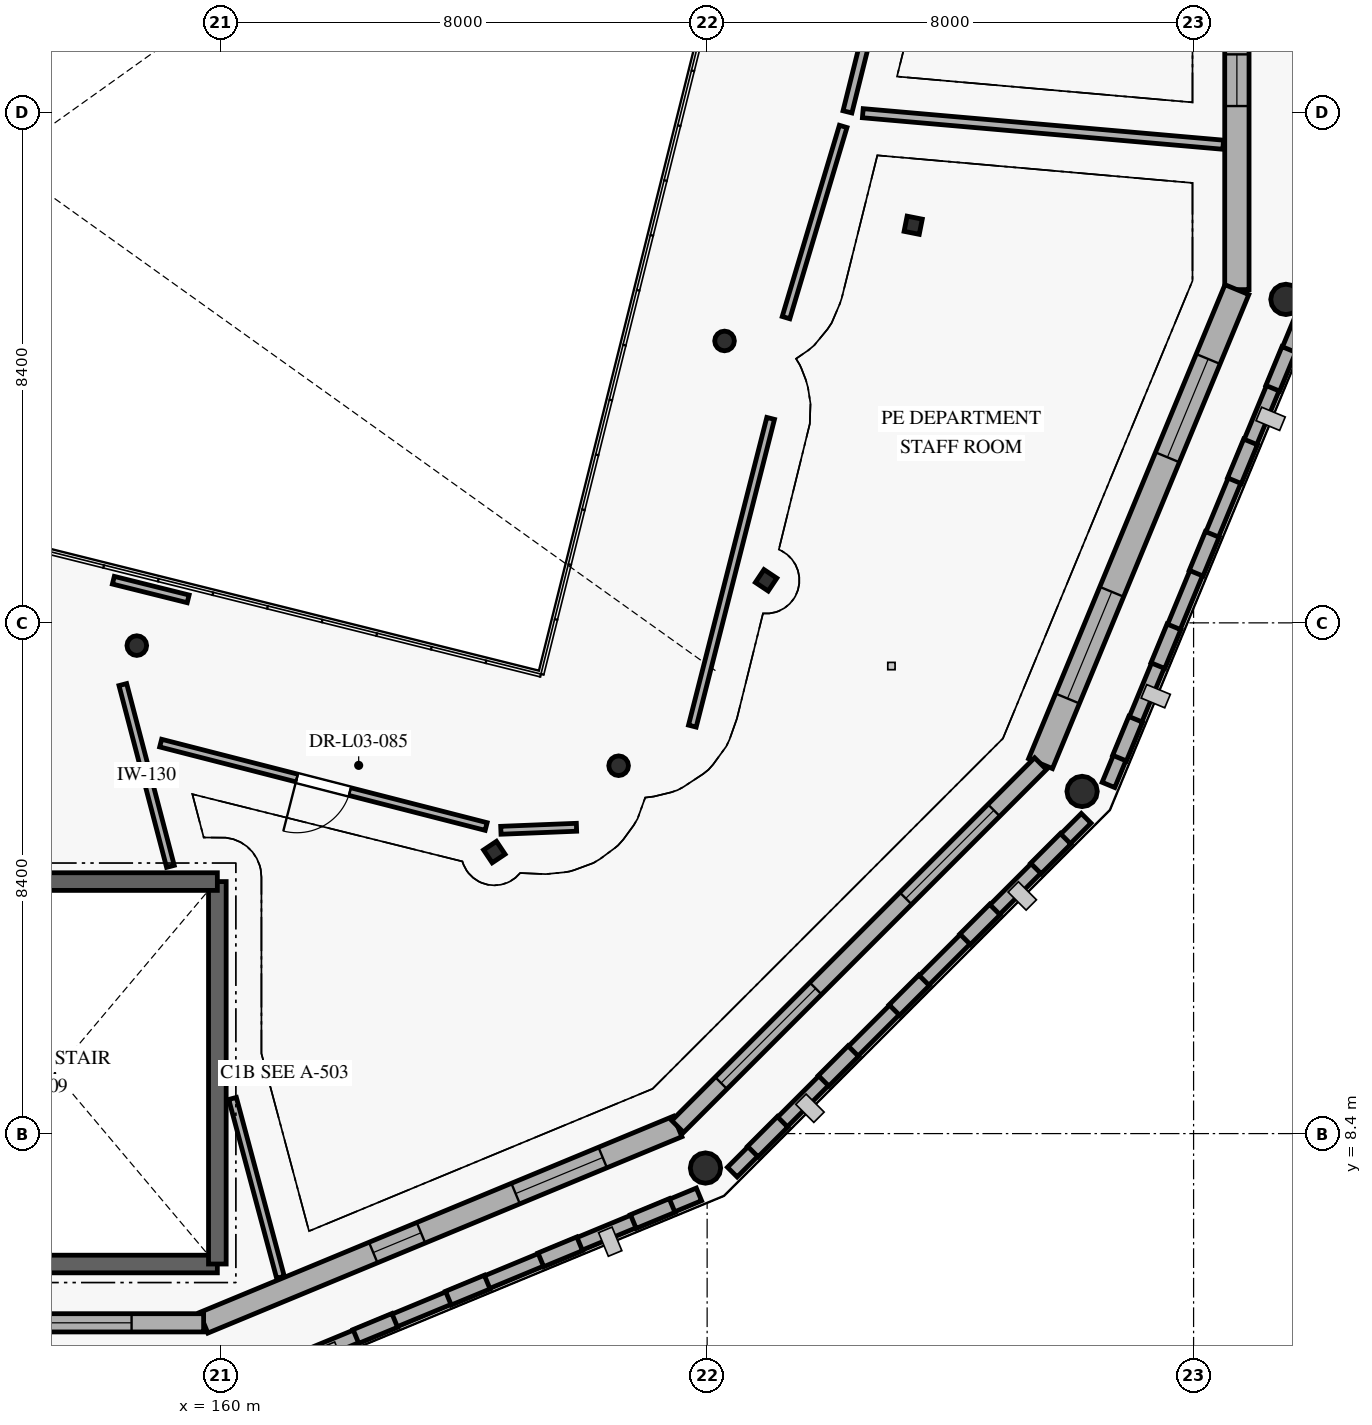
"""IFC4 building model, lengths in metres.
Left out: names, types, materials, properties, quantities, classifications, styles, units other than length and angle.
Written with IfcOpenShell. Run it as: python <this file> out.ifc"""

import sys

from ifc_helpers import new_model, si_unit, direction, frame, frame_2d, origin, origin_2d, place, context, subcontext, project, spatial, rectangle, circle, hollow_circle, i_section, extrude, element, fill, save


model = new_model("IFC4")
c1 = context("Model", 3, precision=1e-05, world=origin(), true_north=direction((0.0, 1.0)))
c2 = subcontext(c1, "Body", "Model", "MODEL_VIEW")
j1 = project(units=[si_unit("LENGTHUNIT", "METRE"), si_unit("PLANEANGLEUNIT", "RADIAN")], contexts=[c1])
p1 = place(None, origin())
s1 = spatial("IfcSite", under=j1, at=p1, CompositionType="ELEMENT")
p2 = place(p1, origin())
s2 = spatial("IfcBuilding", under=s1, at=p2, CompositionType="ELEMENT")
p3 = place(p2, frame((0.0, 0.0, 12.6)))
s3 = spatial("IfcBuildingStorey", under=s2, at=p3, CompositionType="ELEMENT", Elevation=12.6)
for number, where, z_axis, x_axis in (
    (1, (158.62, 16.426, 0.0), (0.0, 0.0, 1.0), (0.97, -0.242, 0.0)),
    (2, (166.544, 14.45, 0.0), (0.0, 0.0, 1.0), (0.97, -0.242, 0.0)),
    (3, (168.286, 21.437, 0.0), (0.0, 0.0, 1.0), (0.97, -0.242, 0.0)),
):
    element("IfcColumn", number, at=place(p3, frame(where, z_axis=z_axis, x_axis=x_axis)), inside=s3, PredefinedType="COLUMN", context=c2, shape_type="SweptSolid", body=[
        extrude(hollow_circle(Radius=0.162, WallThickness=0.016, at=origin_2d()), origin(), (0.0, 0.0, 1.0), 4.2),
    ])
for number, where, z_axis, x_axis in (
    (4, (167.973, 7.833, 0.0), (0.0, 0.0, 1.0), (0.831, 0.556, 0.0)),
    (5, (174.167, 14.027, 0.0), (0.0, 0.0, 1.0), (0.556, 0.831, 0.0)),
    (6, (177.519, 22.12, 0.0), (0.0, 0.0, 1.0), (0.195, 0.981, 0.0)),
):
    element("IfcColumn", number, at=place(p3, frame(where, z_axis=z_axis, x_axis=x_axis)), inside=s3, PredefinedType="COLUMN", context=c2, shape_type="SweptSolid", body=[
        extrude(circle(Radius=0.25, at=origin_2d()), origin(), (0.0, 0.0, 1.0), 4.2),
    ])
for number, where, z_axis, x_axis in (
    (7, (164.5, 13.03, 0.0), (0.0, 0.0, 1.0), (0.831, 0.556, 0.0)),
    (8, (168.97, 17.5, 0.0), (0.0, 0.0, 1.0), (0.556, 0.831, 0.0)),
    (9, (171.389, 23.34, 0.0), (0.0, 0.0, 1.0), (0.195, 0.981, 0.0)),
):
    element("IfcColumn", number, at=place(p3, frame(where, z_axis=z_axis, x_axis=x_axis)), inside=s3, PredefinedType="COLUMN", context=c2, shape_type="SweptSolid", body=[
        extrude(i_section(OverallWidth=0.255, OverallDepth=0.254, WebThickness=0.009, FlangeThickness=0.014, FilletRadius=0.013, at=origin_2d()), origin(), (0.0, 0.0, 1.0), 4.2),
    ])
p4 = place(p3, frame((167.516, 8.517, 0.0), z_axis=(0.0, 0.0, 1.0), x_axis=(-0.923884604839, -0.382671186453, 0.0)))
e10 = element("IfcWall", 10, at=p4, inside=s3, PredefinedType="SOLIDWALL", context=c2, shape_type="SweptSolid", body=[
    extrude(rectangle(XDim=8.439, YDim=0.365, at=frame_2d((4.219, 0.0))), origin(), (0.0, 0.0, 1.0), 3.94),
])
p5 = place(p4, frame((1.335, 0.0, 0.85)))
e11 = element("IfcOpeningElement", 11, at=p5, cuts=e10, PredefinedType="OPENING", context=c2, shape_type="SweptSolid", body=[
    extrude(rectangle(XDim=1.55, YDim=1.4, at=frame_2d((0.775, 0.7))), frame((0.0, 0.192, 0.0), z_axis=(0.0, -1.0, 0.0), x_axis=(1.0, 0.0, 0.0)), (0.0, 0.0, 1.0), 0.385),
])
p6 = place(p4, frame((4.569, 0.0, 0.85)))
e12 = element("IfcOpeningElement", 12, at=p6, cuts=e10, PredefinedType="OPENING", context=c2, shape_type="SweptSolid", body=[
    extrude(rectangle(XDim=0.85, YDim=1.4, at=frame_2d((0.425, 0.7))), frame((0.0, 0.192, 0.0), z_axis=(0.0, -1.0, 0.0), x_axis=(1.0, 0.0, 0.0)), (0.0, 0.0, 1.0), 0.385),
])
p7 = place(p3, frame((159.719, 5.288, 0.0), z_axis=(0.0, 0.0, 1.0), x_axis=(-1.0, 0.0, 0.0)))
e13 = element("IfcWall", 13, at=p7, inside=s3, PredefinedType="SOLIDWALL", context=c2, shape_type="SweptSolid", body=[
    extrude(rectangle(XDim=8.438, YDim=0.3, at=frame_2d((4.219, 0.0))), origin(), (0.0, 0.0, 1.0), 3.94),
])
p8 = place(p7, frame((1.185, 0.0, 0.85)))
e14 = element("IfcOpeningElement", 14, at=p8, cuts=e13, PredefinedType="OPENING", context=c2, shape_type="SweptSolid", body=[
    extrude(rectangle(XDim=1.85, YDim=1.4, at=frame_2d((0.925, 0.7))), frame((0.0, 0.16, 0.0), z_axis=(0.0, -1.0, 0.0), x_axis=(1.0, 0.0, 0.0)), (0.0, 0.0, 1.0), 0.32),
])
p9 = place(p7, frame((4.569, 0.0, 0.85)))
e15 = element("IfcOpeningElement", 15, at=p9, cuts=e13, PredefinedType="OPENING", context=c2, shape_type="SweptSolid", body=[
    extrude(rectangle(XDim=0.85, YDim=1.4, at=frame_2d((0.425, 0.7))), frame((0.0, 0.16, 0.0), z_axis=(0.0, -1.0, 0.0), x_axis=(1.0, 0.0, 0.0)), (0.0, 0.0, 1.0), 0.32),
])
p10 = place(p3, frame((176.712, 30.719, 0.0), z_axis=(0.0, 0.0, 1.0), x_axis=(0.0, -1.0, 0.0)))
e16 = element("IfcWall", 16, at=p10, inside=s3, PredefinedType="SOLIDWALL", context=c2, shape_type="SweptSolid", body=[
    extrude(rectangle(XDim=8.438, YDim=0.4, at=frame_2d((4.219, 0.0))), origin(), (0.0, 0.0, 1.0), 3.94),
])
p11 = place(p10, frame((1.385, 0.0, 0.85)))
e17 = element("IfcOpeningElement", 17, at=p11, cuts=e16, PredefinedType="OPENING", context=c2, shape_type="SweptSolid", body=[
    extrude(rectangle(XDim=1.45, YDim=1.8, at=frame_2d((0.725, 0.9))), frame((0.0, 0.21, 0.0), z_axis=(0.0, -1.0, 0.0), x_axis=(1.0, 0.0, 0.0)), (0.0, 0.0, 1.0), 0.42),
])
p12 = place(p10, frame((4.569, 0.0, 0.85)))
e18 = element("IfcOpeningElement", 18, at=p12, cuts=e16, PredefinedType="OPENING", context=c2, shape_type="SweptSolid", body=[
    extrude(rectangle(XDim=0.85, YDim=1.4, at=frame_2d((0.425, 0.7))), frame((0.0, 0.21, 0.0), z_axis=(0.0, -1.0, 0.0), x_axis=(1.0, 0.0, 0.0)), (0.0, 0.0, 1.0), 0.42),
])
p13 = place(p3, frame((176.712, 22.281, 0.0), z_axis=(0.0, 0.0, 1.0), x_axis=(-0.382671186453, -0.923884604839, 0.0)))
e19 = element("IfcWall", 19, at=p13, inside=s3, PredefinedType="SOLIDWALL", context=c2, shape_type="SweptSolid", body=[
    extrude(rectangle(XDim=8.439, YDim=0.425, at=frame_2d((4.219, 0.0))), origin(), (0.0, 0.0, 1.0), 3.94),
])
p14 = place(p13, frame((1.235, 0.0, 0.85)))
e20 = element("IfcOpeningElement", 20, at=p14, cuts=e19, PredefinedType="OPENING", context=c2, shape_type="SweptSolid", body=[
    extrude(rectangle(XDim=1.75, YDim=1.8, at=frame_2d((0.875, 0.9))), frame((0.0, 0.222, 0.0), z_axis=(0.0, -1.0, 0.0), x_axis=(1.0, 0.0, 0.0)), (0.0, 0.0, 1.0), 0.445),
])
p15 = place(p13, frame((5.379, 0.0, 0.85)))
e21 = element("IfcOpeningElement", 21, at=p15, cuts=e19, PredefinedType="OPENING", context=c2, shape_type="SweptSolid", body=[
    extrude(rectangle(XDim=1.9, YDim=1.8, at=frame_2d((0.95, 0.9))), frame((0.0, 0.222, 0.0), z_axis=(0.0, -1.0, 0.0), x_axis=(1.0, 0.0, 0.0)), (0.0, 0.0, 1.0), 0.445),
])
p16 = place(p3, frame((173.483, 14.484, 0.0), z_axis=(0.0, 0.0, 1.0), x_axis=(-0.707106781187, -0.707106781187, 0.0)))
e22 = element("IfcWall", 22, at=p16, inside=s3, PredefinedType="SOLIDWALL", context=c2, shape_type="SweptSolid", body=[
    extrude(rectangle(XDim=8.439, YDim=0.275, at=frame_2d((4.219, 0.0))), origin(), (0.0, 0.0, 1.0), 3.94),
])
p17 = place(p16, frame((1.085, 0.0, 0.85)))
e23 = element("IfcOpeningElement", 23, at=p17, cuts=e22, PredefinedType="OPENING", context=c2, shape_type="SweptSolid", body=[
    extrude(rectangle(XDim=2.05, YDim=1.8, at=frame_2d((1.025, 0.9))), frame((0.0, 0.147, 0.0), z_axis=(0.0, -1.0, 0.0), x_axis=(1.0, 0.0, 0.0)), (0.0, 0.0, 1.0), 0.295),
])
p18 = place(p16, frame((5.229, 0.0, 0.85)))
e24 = element("IfcOpeningElement", 24, at=p18, cuts=e22, PredefinedType="OPENING", context=c2, shape_type="SweptSolid", body=[
    extrude(rectangle(XDim=2.2, YDim=1.8, at=frame_2d((1.1, 0.9))), frame((0.0, 0.147, 0.0), z_axis=(0.0, -1.0, 0.0), x_axis=(1.0, 0.0, 0.0)), (0.0, 0.0, 1.0), 0.295),
])
p19 = place(p3, frame((160.262, 4.251, 0.0), z_axis=(0.0, 0.0, 1.0), x_axis=(0.923877990426, 0.382687155267, 0.0)))
e25 = element("IfcWall", 25, at=p19, inside=s3, PredefinedType="ELEMENTEDWALL", context=c2, shape_type="SweptSolid", body=[
    extrude(rectangle(XDim=8.23, YDim=0.225, at=frame_2d((4.115, 0.0))), origin(), (0.0, 0.0, 1.0), 1.09),
])
p20 = place(p3, frame((162.224, 5.063, 1.09), z_axis=(0.0, 0.0, 1.0), x_axis=(0.923848822335, 0.382757564877, 0.0)))
e26 = element("IfcWall", 26, at=p20, inside=s3, PredefinedType="ELEMENTEDWALL", context=c2, shape_type="SweptSolid", body=[
    extrude(rectangle(XDim=0.691, YDim=0.245, at=frame_2d((0.345, 0.0))), origin(), (0.0, 0.0, 1.0), 2.85),
])
for number, where, z_axis, x_axis in (
    (27, (163.745, 5.693, 1.09), (0.0, 0.0, 1.0), (0.924, 0.383, 0.0)),
    (28, (165.265, 6.323, 1.09), (0.0, 0.0, 1.0), (0.924, 0.383, 0.0)),
    (29, (166.786, 6.953, 1.09), (0.0, 0.0, 1.0), (0.924, 0.383, 0.0)),
):
    element("IfcWall", number, at=place(p3, frame(where, z_axis=z_axis, x_axis=x_axis)), inside=s3, PredefinedType="ELEMENTEDWALL", context=c2, shape_type="SweptSolid", body=[
        extrude(rectangle(XDim=0.691, YDim=0.245, at=frame_2d((0.345, 0.0))), origin(), (0.0, 0.0, 1.0), 2.85),
    ])
p21 = place(p3, frame((168.414, 7.767, 0.0), z_axis=(0.0, 0.0, 1.0), x_axis=(0.707106781187, 0.707106781187, 0.0)))
e30 = element("IfcWall", 30, at=p21, inside=s3, PredefinedType="ELEMENTEDWALL", context=c2, shape_type="SweptSolid", body=[
    extrude(rectangle(XDim=8.23, YDim=0.225, at=frame_2d((4.115, 0.0))), origin(), (0.0, 0.0, 1.0), 1.09),
])
p22 = place(p3, frame((168.752, 8.104, 1.09), z_axis=(0.0, 0.0, 1.0), x_axis=(0.706930114916, 0.707283403329, 0.0)))
e31 = element("IfcWall", 31, at=p22, inside=s3, PredefinedType="ELEMENTEDWALL", context=c2, shape_type="SweptSolid", body=[
    extrude(rectangle(XDim=0.691, YDim=0.245, at=frame_2d((0.346, 0.0))), origin(), (0.0, 0.0, 1.0), 2.85),
])
p23 = place(p3, frame((169.916, 9.268, 1.09), z_axis=(0.0, 0.0, 1.0), x_axis=(0.707106781187, 0.707106781187, 0.0)))
e32 = element("IfcWall", 32, at=p23, inside=s3, PredefinedType="ELEMENTEDWALL", context=c2, shape_type="SweptSolid", body=[
    extrude(rectangle(XDim=0.691, YDim=0.245, at=frame_2d((0.345, 0.0))), origin(), (0.0, 0.0, 1.0), 2.85),
])
p24 = place(p3, frame((171.079, 10.432, 1.09), z_axis=(0.0, 0.0, 1.0), x_axis=(0.707106781187, 0.707106781187, 0.0)))
e33 = element("IfcWall", 33, at=p24, inside=s3, PredefinedType="ELEMENTEDWALL", context=c2, shape_type="SweptSolid", body=[
    extrude(rectangle(XDim=0.691, YDim=0.245, at=frame_2d((0.346, 0.0))), origin(), (0.0, 0.0, 1.0), 2.85),
])
p25 = place(p3, frame((172.243, 11.596, 1.09), z_axis=(0.0, 0.0, 1.0), x_axis=(0.707106781187, 0.707106781187, 0.0)))
e34 = element("IfcWall", 34, at=p25, inside=s3, PredefinedType="ELEMENTEDWALL", context=c2, shape_type="SweptSolid", body=[
    extrude(rectangle(XDim=0.691, YDim=0.245, at=frame_2d((0.345, 0.0))), origin(), (0.0, 0.0, 1.0), 2.85),
])
p26 = place(p3, frame((173.407, 12.76, 1.09), z_axis=(0.0, 0.0, 1.0), x_axis=(0.707283403329, 0.706930114916, 0.0)))
e35 = element("IfcWall", 35, at=p26, inside=s3, PredefinedType="ELEMENTEDWALL", context=c2, shape_type="SweptSolid", body=[
    extrude(rectangle(XDim=0.691, YDim=0.245, at=frame_2d((0.346, 0.0))), origin(), (0.0, 0.0, 1.0), 2.85),
])
p27 = place(p3, frame((174.6, 14.135, 0.0), z_axis=(0.0, 0.0, 1.0), x_axis=(0.382687155267, 0.923877990426, 0.0)))
e36 = element("IfcWall", 36, at=p27, inside=s3, PredefinedType="ELEMENTEDWALL", context=c2, shape_type="SweptSolid", body=[
    extrude(rectangle(XDim=8.23, YDim=0.225, at=frame_2d((4.115, 0.0))), origin(), (0.0, 0.0, 1.0), 1.09),
])
for number, where, z_axis, x_axis in (
    (37, (174.783, 14.576, 1.09), (0.0, 0.0, 1.0), (0.383, 0.924, 0.0)),
    (38, (175.413, 16.096, 1.09), (0.0, 0.0, 1.0), (0.383, 0.924, 0.0)),
    (39, (176.042, 17.617, 1.09), (0.0, 0.0, 1.0), (0.383, 0.924, 0.0)),
):
    element("IfcWall", number, at=place(p3, frame(where, z_axis=z_axis, x_axis=x_axis)), inside=s3, PredefinedType="ELEMENTEDWALL", context=c2, shape_type="SweptSolid", body=[
        extrude(rectangle(XDim=0.691, YDim=0.245, at=frame_2d((0.345, 0.0))), origin(), (0.0, 0.0, 1.0), 2.85),
    ])
p28 = place(p3, frame((176.672, 19.138, 1.09), z_axis=(0.0, 0.0, 1.0), x_axis=(0.382757564877, 0.923848822335, 0.0)))
e40 = element("IfcWall", 40, at=p28, inside=s3, PredefinedType="ELEMENTEDWALL", context=c2, shape_type="SweptSolid", body=[
    extrude(rectangle(XDim=0.691, YDim=0.245, at=frame_2d((0.345, 0.0))), origin(), (0.0, 0.0, 1.0), 2.85),
])
p29 = place(p3, frame((177.302, 20.658, 1.09), z_axis=(0.0, 0.0, 1.0), x_axis=(0.382934147939, 0.92377564286, 0.0)))
e41 = element("IfcWall", 41, at=p29, inside=s3, PredefinedType="ELEMENTEDWALL", context=c2, shape_type="SweptSolid", body=[
    extrude(rectangle(XDim=0.691, YDim=0.245, at=frame_2d((0.346, 0.0))), origin(), (0.0, 0.0, 1.0), 2.85),
])
p30 = place(p3, frame((153.055, 6.255, 0.0), z_axis=(0.0, 0.0, 1.0), x_axis=(1.0, 0.0, 0.0)))
e42 = element("IfcWall", 42, at=p30, inside=s3, PredefinedType="SHEAR", context=c2, shape_type="SweptSolid", body=[
    extrude(rectangle(XDim=6.89, YDim=0.29, at=frame_2d((3.445, 0.0))), origin(), (0.0, 0.0, 1.0), 3.95),
])
p31 = place(p3, frame((159.945, 6.255, 0.0), z_axis=(0.0, 0.0, 1.0), x_axis=(0.0, 1.0, 0.0)))
e43 = element("IfcWall", 43, at=p31, inside=s3, PredefinedType="SHEAR", context=c2, shape_type="SweptSolid", body=[
    extrude(rectangle(XDim=6.29, YDim=0.29, at=frame_2d((3.145, 0.0))), origin(), (0.0, 0.0, 1.0), 3.95),
])
p32 = place(p3, frame((159.945, 12.545, 0.0), z_axis=(0.0, 0.0, 1.0), x_axis=(-1.0, 0.0, 0.0)))
e44 = element("IfcWall", 44, at=p32, inside=s3, PredefinedType="SHEAR", context=c2, shape_type="SweptSolid", body=[
    extrude(rectangle(XDim=6.89, YDim=0.29, at=frame_2d((3.445, 0.0))), origin(), (0.0, 0.0, 1.0), 3.95),
])
p33 = place(p3, frame((170.751, 26.984, 0.0), z_axis=(0.0, 0.0, 1.0), x_axis=(-0.241877803241, -0.970306718672, 0.0)))
e45 = element("IfcWall", 45, at=p33, inside=s3, PredefinedType="PARTITIONING", context=c2, shape_type="SweptSolid", body=[
    extrude(rectangle(XDim=1.834, YDim=0.15, at=frame_2d((0.917, 0.0))), origin(), (0.0, 0.0, 1.0), 3.95),
])
p34 = place(p3, frame((170.56, 25.182, 0.0), z_axis=(0.0, 0.0, 1.0), x_axis=(0.996194563718, -0.087157278632, 0.0)))
e46 = element("IfcWall", 46, at=p34, inside=s3, PredefinedType="PARTITIONING", context=c2, shape_type="SweptSolid", body=[
    extrude(rectangle(XDim=5.95, YDim=0.15, at=frame_2d((2.975, 0.0))), origin(), (0.0, 0.0, 1.0), 3.95),
])
p35 = place(p3, frame((158.39, 15.785, 0.0), z_axis=(0.0, 0.0, 1.0), x_axis=(0.253318912182, -0.96738282429, 0.0)))
e47 = element("IfcWall", 47, at=p35, inside=s3, PredefinedType="PARTITIONING", context=c2, shape_type="SweptSolid", body=[
    extrude(rectangle(XDim=3.091, YDim=0.13, at=frame_2d((1.545, 0.0))), origin(), (0.0, 0.0, 1.0), 3.95),
])
p36 = place(p3, frame((160.195, 8.978, 0.0), z_axis=(0.0, 0.0, 1.0), x_axis=(0.258834917797, -0.965921573074, 0.0)))
e48 = element("IfcWall", 48, at=p36, inside=s3, PredefinedType="PARTITIONING", context=c2, shape_type="SweptSolid", body=[
    extrude(rectangle(XDim=3.046, YDim=0.13, at=frame_2d((1.523, 0.0))), origin(), (0.0, 0.0, 1.0), 3.95),
])
p37 = place(p3, frame((170.237, 24.965, 0.0), z_axis=(0.0, 0.0, 1.0), x_axis=(-0.286371895117, -0.958118540519, 0.0)))
e49 = element("IfcWall", 49, at=p37, inside=s3, PredefinedType="PARTITIONING", context=c2, shape_type="SweptSolid", body=[
    extrude(rectangle(XDim=3.282, YDim=0.13, at=frame_2d((1.641, 0.0))), origin(), (0.0, 0.0, 1.0), 3.95),
])
p38 = place(p3, frame((169.044, 20.163, 0.0), z_axis=(0.0, 0.0, 1.0), x_axis=(-0.246570708489, -0.969124803993, 0.0)))
e50 = element("IfcWall", 50, at=p38, inside=s3, PredefinedType="PARTITIONING", context=c2, shape_type="SweptSolid", body=[
    extrude(rectangle(XDim=5.222, YDim=0.13, at=frame_2d((2.611, 0.0))), origin(), (0.0, 0.0, 1.0), 3.95),
])
p39 = place(p3, frame((165.852, 13.438, 0.0), z_axis=(0.0, 0.0, 1.0), x_axis=(-0.999199077564, -0.04001503962, 0.0)))
e51 = element("IfcWall", 51, at=p39, inside=s3, PredefinedType="PARTITIONING", context=c2, shape_type="SweptSolid", body=[
    extrude(rectangle(XDim=1.245, YDim=0.13, at=frame_2d((0.622, 0.0))), origin(), (0.0, 0.0, 1.0), 3.95),
])
p40 = place(p3, frame((164.366, 13.45, 0.0), z_axis=(0.0, 0.0, 1.0), x_axis=(-0.968696291163, 0.248248857979, 0.0)))
e52 = element("IfcWall", 52, at=p40, inside=s3, PredefinedType="PARTITIONING", context=c2, shape_type="SweptSolid", body=[
    extrude(rectangle(XDim=5.526, YDim=0.13, at=frame_2d((2.763, 0.0))), origin(), (0.0, 0.0, 1.0), 3.95),
])
p41 = place(p40, frame((2.313, 0.0, 0.0)))
e53 = element("IfcOpeningElement", 53, at=p41, cuts=e52, PredefinedType="OPENING", context=c2, shape_type="SweptSolid", body=[
    extrude(rectangle(XDim=0.9, YDim=2.05, at=frame_2d((0.45, 1.025))), frame((0.0, 0.075, 0.0), z_axis=(0.0, -1.0, 0.0), x_axis=(1.0, 0.0, 0.0)), (0.0, 0.0, 1.0), 0.15),
])
p42 = place(p3, frame((159.465, 17.195, 0.0), z_axis=(0.0, 0.0, 1.0), x_axis=(-0.970323428915, 0.241810759269, 0.0)))
e54 = element("IfcWall", 54, at=p42, inside=s3, PredefinedType="PARTITIONING", context=c2, shape_type="SweptSolid", body=[
    extrude(rectangle(XDim=1.268, YDim=0.13, at=frame_2d((0.634, 0.0))), origin(), (0.0, 0.0, 1.0), 3.95),
])
p43 = place(p5, origin())
e55 = element("IfcWindow", 55, at=p43, inside=s3, PartitioningType="SINGLE_PANEL", PredefinedType="WINDOW", context=c2, shape_type="SweptSolid", body=[
    extrude(rectangle(XDim=1.55, YDim=1.4, at=frame_2d((0.775, 0.7))), frame((0.0, 0.03, 0.0), z_axis=(0.0, -1.0, 0.0), x_axis=(1.0, 0.0, 0.0)), (0.0, 0.0, 1.0), 0.06),
])
fill(e11, e55)
p44 = place(p6, origin())
e56 = element("IfcWindow", 56, at=p44, inside=s3, PartitioningType="SINGLE_PANEL", PredefinedType="WINDOW", context=c2, shape_type="SweptSolid", body=[
    extrude(rectangle(XDim=0.85, YDim=1.4, at=frame_2d((0.425, 0.7))), frame((0.0, 0.03, 0.0), z_axis=(0.0, -1.0, 0.0), x_axis=(1.0, 0.0, 0.0)), (0.0, 0.0, 1.0), 0.06),
])
fill(e12, e56)
p45 = place(p8, origin())
e57 = element("IfcWindow", 57, at=p45, inside=s3, PartitioningType="SINGLE_PANEL", PredefinedType="WINDOW", context=c2, shape_type="SweptSolid", body=[
    extrude(rectangle(XDim=1.85, YDim=1.4, at=frame_2d((0.925, 0.7))), frame((0.0, 0.03, 0.0), z_axis=(0.0, -1.0, 0.0), x_axis=(1.0, 0.0, 0.0)), (0.0, 0.0, 1.0), 0.06),
])
fill(e14, e57)
p46 = place(p12, origin())
e58 = element("IfcWindow", 58, at=p46, inside=s3, PartitioningType="SINGLE_PANEL", PredefinedType="WINDOW", context=c2, shape_type="SweptSolid", body=[
    extrude(rectangle(XDim=0.85, YDim=1.4, at=frame_2d((0.425, 0.7))), frame((0.0, 0.03, 0.0), z_axis=(0.0, -1.0, 0.0), x_axis=(1.0, 0.0, 0.0)), (0.0, 0.0, 1.0), 0.06),
])
fill(e18, e58)
p47 = place(p14, origin())
e59 = element("IfcWindow", 59, at=p47, inside=s3, PartitioningType="SINGLE_PANEL", PredefinedType="WINDOW", context=c2, shape_type="SweptSolid", body=[
    extrude(rectangle(XDim=1.75, YDim=1.8, at=frame_2d((0.875, 0.9))), frame((0.0, 0.03, 0.0), z_axis=(0.0, -1.0, 0.0), x_axis=(1.0, 0.0, 0.0)), (0.0, 0.0, 1.0), 0.06),
])
fill(e20, e59)
p48 = place(p15, origin())
e60 = element("IfcWindow", 60, at=p48, inside=s3, PartitioningType="SINGLE_PANEL", PredefinedType="WINDOW", context=c2, shape_type="SweptSolid", body=[
    extrude(rectangle(XDim=1.9, YDim=1.8, at=frame_2d((0.95, 0.9))), frame((0.0, 0.03, 0.0), z_axis=(0.0, -1.0, 0.0), x_axis=(1.0, 0.0, 0.0)), (0.0, 0.0, 1.0), 0.06),
])
fill(e21, e60)
p49 = place(p17, origin())
e61 = element("IfcWindow", 61, at=p49, inside=s3, PartitioningType="SINGLE_PANEL", PredefinedType="WINDOW", context=c2, shape_type="SweptSolid", body=[
    extrude(rectangle(XDim=2.05, YDim=1.8, at=frame_2d((1.025, 0.9))), frame((0.0, 0.03, 0.0), z_axis=(0.0, -1.0, 0.0), x_axis=(1.0, 0.0, 0.0)), (0.0, 0.0, 1.0), 0.06),
])
fill(e23, e61)
p50 = place(p18, origin())
e62 = element("IfcWindow", 62, at=p50, inside=s3, PartitioningType="SINGLE_PANEL", PredefinedType="WINDOW", context=c2, shape_type="SweptSolid", body=[
    extrude(rectangle(XDim=2.2, YDim=1.8, at=frame_2d((1.1, 0.9))), frame((0.0, 0.03, 0.0), z_axis=(0.0, -1.0, 0.0), x_axis=(1.0, 0.0, 0.0)), (0.0, 0.0, 1.0), 0.06),
])
fill(e24, e62)
p51 = place(p41, origin())
e63 = element("IfcDoor", 63, at=p51, inside=s3, OperationType="SINGLE_SWING_RIGHT", PredefinedType="DOOR", context=c2, shape_type="SweptSolid", body=[
    extrude(rectangle(XDim=0.9, YDim=2.05, at=frame_2d((0.45, 1.025))), frame((0.0, 0.025, 0.0), z_axis=(0.0, -1.0, 0.0), x_axis=(1.0, 0.0, 0.0)), (0.0, 0.0, 1.0), 0.05),
])
fill(e53, e63)
save(model, sys.argv[1])
